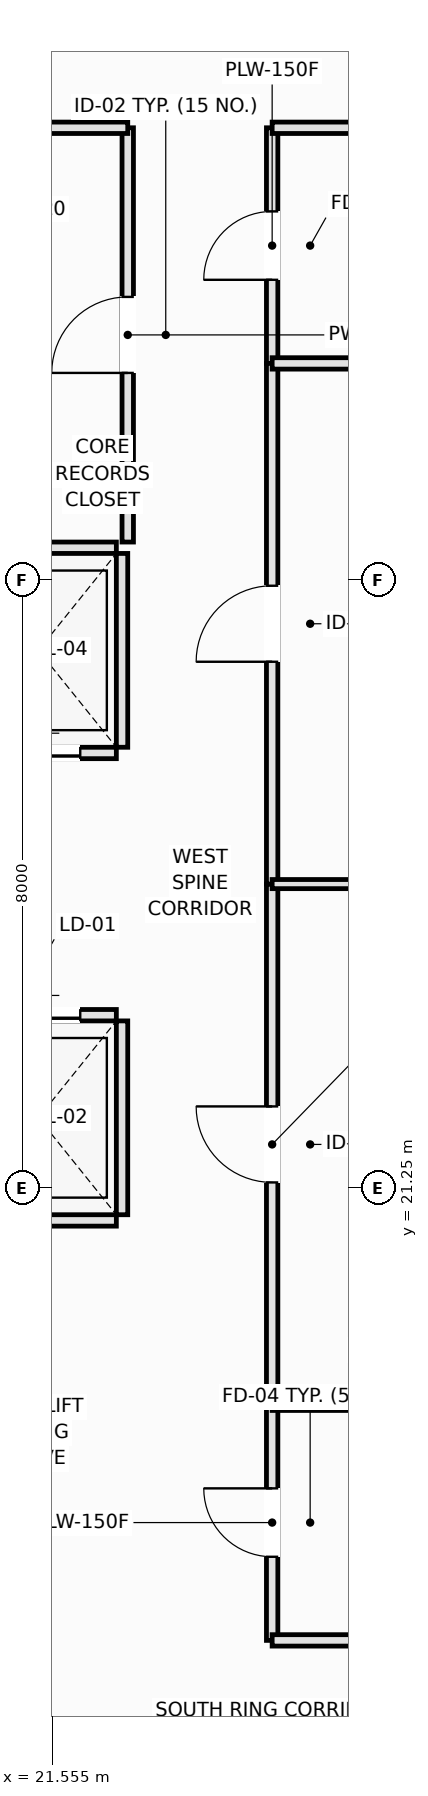
"""IFC4 building model, lengths in metres.
Left out: names, types, materials, properties, quantities, classifications, styles, units other than length and angle.
Written with IfcOpenShell. Run it as: python <this file> out.ifc"""

import sys

from ifc_helpers import new_model, si_unit, direction, frame, frame_2d, origin, place, context, subcontext, project, spatial, rectangle, extrude, element, fill, save


model = new_model("IFC4")
c1 = context("Model", 3, precision=1e-05, world=origin(), true_north=direction((0.0, 1.0)))
c2 = subcontext(c1, "Body", "Model", "MODEL_VIEW")
j1 = project(units=[si_unit("LENGTHUNIT", "METRE"), si_unit("PLANEANGLEUNIT", "RADIAN")], contexts=[c1])
p1 = place(None, origin())
s1 = spatial("IfcSite", under=j1, at=p1, CompositionType="ELEMENT")
p2 = place(p1, origin())
s2 = spatial("IfcBuilding", under=s1, at=p2, CompositionType="ELEMENT")
p3 = place(p2, frame((0.0, 0.0, 54.0)))
s3 = spatial("IfcBuildingStorey", under=s2, at=p3, CompositionType="ELEMENT", Elevation=54.0)
p4 = place(p3, frame((20.35, 20.825, 0.0), z_axis=(0.0, 0.0, 1.0), x_axis=(1.0, 0.0, 0.0)))
e1 = element("IfcWall", 1, at=p4, inside=s3, PredefinedType="PARTITIONING", context=c2, shape_type="SweptSolid", body=[
    extrude(rectangle(XDim=2.05, YDim=0.15, at=frame_2d((1.025, 0.0))), origin(), (0.0, 0.0, 1.0), 3.37),
])
p5 = place(p3, frame((20.35, 23.525, 0.0), z_axis=(0.0, 0.0, 1.0), x_axis=(1.0, 0.0, 0.0)))
e2 = element("IfcWall", 2, at=p5, inside=s3, PredefinedType="PARTITIONING", context=c2, shape_type="SweptSolid", body=[
    extrude(rectangle(XDim=2.05, YDim=0.15, at=frame_2d((1.025, 0.0))), origin(), (0.0, 0.0, 1.0), 3.37),
])
p6 = place(p5, frame((0.475, 0.0, 0.0)))
e3 = element("IfcOpeningElement", 3, at=p6, cuts=e2, PredefinedType="OPENING", context=c2, shape_type="SweptSolid", body=[
    extrude(rectangle(XDim=1.1, YDim=2.2, at=frame_2d((0.55, 1.1))), frame((0.0, 0.085, 0.0), z_axis=(0.0, -1.0, 0.0), x_axis=(1.0, 0.0, 0.0)), (0.0, 0.0, 1.0), 0.17),
])
p7 = place(p3, frame((22.475, 20.9, 0.0), z_axis=(0.0, 0.0, 1.0), x_axis=(0.0, 1.0, 0.0)))
e4 = element("IfcWall", 4, at=p7, inside=s3, PredefinedType="PARTITIONING", context=c2, shape_type="SweptSolid", body=[
    extrude(rectangle(XDim=2.55, YDim=0.15, at=frame_2d((1.275, 0.0))), origin(), (0.0, 0.0, 1.0), 3.37),
])
p8 = place(p3, frame((20.35, 26.975, 0.0), z_axis=(0.0, 0.0, 1.0), x_axis=(1.0, 0.0, 0.0)))
e5 = element("IfcWall", 5, at=p8, inside=s3, PredefinedType="PARTITIONING", context=c2, shape_type="SweptSolid", body=[
    extrude(rectangle(XDim=2.05, YDim=0.15, at=frame_2d((1.025, 0.0))), origin(), (0.0, 0.0, 1.0), 3.37),
])
p9 = place(p8, frame((0.475, 0.0, 0.0)))
e6 = element("IfcOpeningElement", 6, at=p9, cuts=e5, PredefinedType="OPENING", context=c2, shape_type="SweptSolid", body=[
    extrude(rectangle(XDim=1.1, YDim=2.2, at=frame_2d((0.55, 1.1))), frame((0.0, 0.085, 0.0), z_axis=(0.0, -1.0, 0.0), x_axis=(1.0, 0.0, 0.0)), (0.0, 0.0, 1.0), 0.17),
])
p10 = place(p3, frame((20.35, 29.675, 0.0), z_axis=(0.0, 0.0, 1.0), x_axis=(1.0, 0.0, 0.0)))
e7 = element("IfcWall", 7, at=p10, inside=s3, PredefinedType="PARTITIONING", context=c2, shape_type="SweptSolid", body=[
    extrude(rectangle(XDim=2.05, YDim=0.15, at=frame_2d((1.025, 0.0))), origin(), (0.0, 0.0, 1.0), 3.37),
])
p11 = place(p3, frame((22.475, 27.05, 0.0), z_axis=(0.0, 0.0, 1.0), x_axis=(0.0, 1.0, 0.0)))
e8 = element("IfcWall", 8, at=p11, inside=s3, PredefinedType="PARTITIONING", context=c2, shape_type="SweptSolid", body=[
    extrude(rectangle(XDim=2.55, YDim=0.15, at=frame_2d((1.275, 0.0))), origin(), (0.0, 0.0, 1.0), 3.37),
])
p12 = place(p3, frame((22.55, 29.75, 0.0), z_axis=(0.0, 0.0, 1.0), x_axis=(0.0, 1.0, 0.0)))
e9 = element("IfcWall", 9, at=p12, inside=s3, PredefinedType="PARTITIONING", context=c2, shape_type="SweptSolid", body=[
    extrude(rectangle(XDim=5.45, YDim=0.15, at=frame_2d((2.725, 0.0))), origin(), (0.0, 0.0, 1.0), 3.01),
])
p13 = place(p12, frame((2.225, 0.0, 0.0)))
e10 = element("IfcOpeningElement", 10, at=p13, cuts=e9, PredefinedType="OPENING", context=c2, shape_type="SweptSolid", body=[
    extrude(rectangle(XDim=1.0, YDim=2.15, at=frame_2d((0.5, 1.075))), frame((0.0, 0.085, 0.0), z_axis=(0.0, -1.0, 0.0), x_axis=(1.0, 0.0, 0.0)), (0.0, 0.0, 1.0), 0.17),
])
p14 = place(p3, frame((24.45, 15.3, 0.0), z_axis=(0.0, 0.0, 1.0), x_axis=(0.0, 1.0, 0.0)))
e11 = element("IfcWall", 11, at=p14, inside=s3, PredefinedType="PLUMBINGWALL", context=c2, shape_type="SweptSolid", body=[
    extrude(rectangle(XDim=3.1, YDim=0.15, at=frame_2d((1.55, 0.0))), origin(), (0.0, 0.0, 1.0), 3.37),
])
p15 = place(p14, frame((1.1, 0.0, 0.0)))
e12 = element("IfcOpeningElement", 12, at=p15, cuts=e11, PredefinedType="OPENING", context=c2, shape_type="SweptSolid", body=[
    extrude(rectangle(XDim=0.9, YDim=2.1, at=frame_2d((0.45, 1.05))), frame((0.0, 0.085, 0.0), z_axis=(0.0, -1.0, 0.0), x_axis=(1.0, 0.0, 0.0)), (0.0, 0.0, 1.0), 0.17),
])
p16 = place(p3, frame((24.45, 32.1, 0.0), z_axis=(0.0, 0.0, 1.0), x_axis=(0.0, 1.0, 0.0)))
e13 = element("IfcWall", 13, at=p16, inside=s3, PredefinedType="PLUMBINGWALL", context=c2, shape_type="SweptSolid", body=[
    extrude(rectangle(XDim=3.1, YDim=0.15, at=frame_2d((1.55, 0.0))), origin(), (0.0, 0.0, 1.0), 3.37),
])
p17 = place(p16, frame((1.1, 0.0, 0.0)))
e14 = element("IfcOpeningElement", 14, at=p17, cuts=e13, PredefinedType="OPENING", context=c2, shape_type="SweptSolid", body=[
    extrude(rectangle(XDim=0.9, YDim=2.1, at=frame_2d((0.45, 1.05))), frame((0.0, 0.085, 0.0), z_axis=(0.0, -1.0, 0.0), x_axis=(1.0, 0.0, 0.0)), (0.0, 0.0, 1.0), 0.17),
])
p18 = place(p3, frame((24.45, 18.4, 0.0), z_axis=(0.0, 0.0, 1.0), x_axis=(0.0, 1.0, 0.0)))
e15 = element("IfcWall", 15, at=p18, inside=s3, PredefinedType="PARTITIONING", context=c2, shape_type="SweptSolid", body=[
    extrude(rectangle(XDim=6.85, YDim=0.15, at=frame_2d((3.425, 0.0))), origin(), (0.0, 0.0, 1.0), 3.37),
])
p19 = place(p18, frame((2.925, 0.0, 0.0)))
e16 = element("IfcOpeningElement", 16, at=p19, cuts=e15, PredefinedType="OPENING", context=c2, shape_type="SweptSolid", body=[
    extrude(rectangle(XDim=1.0, YDim=2.15, at=frame_2d((0.5, 1.075))), frame((0.0, 0.085, 0.0), z_axis=(0.0, -1.0, 0.0), x_axis=(1.0, 0.0, 0.0)), (0.0, 0.0, 1.0), 0.17),
])
p20 = place(p3, frame((24.45, 25.25, 0.0), z_axis=(0.0, 0.0, 1.0), x_axis=(0.0, 1.0, 0.0)))
e17 = element("IfcWall", 17, at=p20, inside=s3, PredefinedType="PARTITIONING", context=c2, shape_type="SweptSolid", body=[
    extrude(rectangle(XDim=6.85, YDim=0.15, at=frame_2d((3.425, 0.0))), origin(), (0.0, 0.0, 1.0), 3.37),
])
p21 = place(p20, frame((2.925, 0.0, 0.0)))
e18 = element("IfcOpeningElement", 18, at=p21, cuts=e17, PredefinedType="OPENING", context=c2, shape_type="SweptSolid", body=[
    extrude(rectangle(XDim=1.0, YDim=2.15, at=frame_2d((0.5, 1.075))), frame((0.0, 0.085, 0.0), z_axis=(0.0, -1.0, 0.0), x_axis=(1.0, 0.0, 0.0)), (0.0, 0.0, 1.0), 0.17),
])
p22 = place(p3, frame((24.45, 15.3, 0.0), z_axis=(0.0, 0.0, 1.0), x_axis=(1.0, 0.0, 0.0)))
e19 = element("IfcWall", 19, at=p22, inside=s3, PredefinedType="PLUMBINGWALL", context=c2, shape_type="SweptSolid", body=[
    extrude(rectangle(XDim=3.15, YDim=0.15, at=frame_2d((1.575, 0.0))), origin(), (0.0, 0.0, 1.0), 3.37),
])
p23 = place(p3, frame((21.25, 35.2, 0.0), z_axis=(0.0, 0.0, 1.0), x_axis=(1.0, 0.0, 0.0)))
e20 = element("IfcWall", 20, at=p23, inside=s3, PredefinedType="PARTITIONING", context=c2, shape_type="SweptSolid", body=[
    extrude(rectangle(XDim=1.3, YDim=0.15, at=frame_2d((0.65, 0.0))), origin(), (0.0, 0.0, 1.0), 3.37),
])
p24 = place(p3, frame((24.45, 35.2, 0.0), z_axis=(0.0, 0.0, 1.0), x_axis=(1.0, 0.0, 0.0)))
e21 = element("IfcWall", 21, at=p24, inside=s3, PredefinedType="PLUMBINGWALL", context=c2, shape_type="SweptSolid", body=[
    extrude(rectangle(XDim=3.15, YDim=0.15, at=frame_2d((1.575, 0.0))), origin(), (0.0, 0.0, 1.0), 3.37),
])
for number, where, z_axis, x_axis in (
    (22, (24.45, 18.4, 0.0), (0.0, 0.0, 1.0), (1.0, 0.0, 0.0)),
    (23, (24.45, 32.1, 0.0), (0.0, 0.0, 1.0), (1.0, 0.0, 0.0)),
):
    element("IfcWall", number, at=place(p3, frame(where, z_axis=z_axis, x_axis=x_axis)), inside=s3, PredefinedType="PLUMBINGWALL", context=c2, shape_type="SweptSolid", body=[
        extrude(rectangle(XDim=3.15, YDim=0.15, at=frame_2d((1.575, 0.0))), origin(), (0.0, 0.0, 1.0), 2.72),
    ])
p25 = place(p3, frame((24.45, 25.25, 0.0), z_axis=(0.0, 0.0, 1.0), x_axis=(1.0, 0.0, 0.0)))
e24 = element("IfcWall", 24, at=p25, inside=s3, PredefinedType="PARTITIONING", context=c2, shape_type="SweptSolid", body=[
    extrude(rectangle(XDim=13.75, YDim=0.12, at=frame_2d((6.875, 0.0))), origin(), (0.0, 0.0, 1.0), 2.72),
])
p26 = place(p6, origin())
e25 = element("IfcDoor", 25, at=p26, inside=s3, OperationType="DOUBLE_DOOR_SLIDING", PredefinedType="DOOR", context=c2, shape_type="SweptSolid", body=[
    extrude(rectangle(XDim=1.1, YDim=2.2, at=frame_2d((0.55, 1.1))), frame((0.0, 0.025, 0.0), z_axis=(0.0, -1.0, 0.0), x_axis=(1.0, 0.0, 0.0)), (0.0, 0.0, 1.0), 0.05),
])
fill(e3, e25)
p27 = place(p9, origin())
e26 = element("IfcDoor", 26, at=p27, inside=s3, OperationType="DOUBLE_DOOR_SLIDING", PredefinedType="DOOR", context=c2, shape_type="SweptSolid", body=[
    extrude(rectangle(XDim=1.1, YDim=2.2, at=frame_2d((0.55, 1.1))), frame((0.0, 0.025, 0.0), z_axis=(0.0, -1.0, 0.0), x_axis=(1.0, 0.0, 0.0)), (0.0, 0.0, 1.0), 0.05),
])
fill(e6, e26)
p28 = place(p13, origin())
e27 = element("IfcDoor", 27, at=p28, inside=s3, OperationType="SINGLE_SWING_LEFT", PredefinedType="DOOR", context=c2, shape_type="SweptSolid", body=[
    extrude(rectangle(XDim=1.0, YDim=2.15, at=frame_2d((0.5, 1.075))), frame((0.0, 0.025, 0.0), z_axis=(0.0, -1.0, 0.0), x_axis=(1.0, 0.0, 0.0)), (0.0, 0.0, 1.0), 0.05),
])
fill(e10, e27)
p29 = place(p15, origin())
e28 = element("IfcDoor", 28, at=p29, inside=s3, OperationType="SINGLE_SWING_RIGHT", PredefinedType="DOOR", context=c2, shape_type="SweptSolid", body=[
    extrude(rectangle(XDim=0.9, YDim=2.1, at=frame_2d((0.45, 1.05))), frame((0.0, 0.025, 0.0), z_axis=(0.0, -1.0, 0.0), x_axis=(1.0, 0.0, 0.0)), (0.0, 0.0, 1.0), 0.05),
])
fill(e12, e28)
p30 = place(p17, origin())
e29 = element("IfcDoor", 29, at=p30, inside=s3, OperationType="SINGLE_SWING_LEFT", PredefinedType="DOOR", context=c2, shape_type="SweptSolid", body=[
    extrude(rectangle(XDim=0.9, YDim=2.1, at=frame_2d((0.45, 1.05))), frame((0.0, 0.025, 0.0), z_axis=(0.0, -1.0, 0.0), x_axis=(1.0, 0.0, 0.0)), (0.0, 0.0, 1.0), 0.05),
])
fill(e14, e29)
p31 = place(p19, origin())
e30 = element("IfcDoor", 30, at=p31, inside=s3, OperationType="SINGLE_SWING_RIGHT", PredefinedType="DOOR", context=c2, shape_type="SweptSolid", body=[
    extrude(rectangle(XDim=1.0, YDim=2.15, at=frame_2d((0.5, 1.075))), frame((0.0, 0.025, 0.0), z_axis=(0.0, -1.0, 0.0), x_axis=(1.0, 0.0, 0.0)), (0.0, 0.0, 1.0), 0.05),
])
fill(e16, e30)
p32 = place(p21, origin())
e31 = element("IfcDoor", 31, at=p32, inside=s3, OperationType="SINGLE_SWING_LEFT", PredefinedType="DOOR", context=c2, shape_type="SweptSolid", body=[
    extrude(rectangle(XDim=1.0, YDim=2.15, at=frame_2d((0.5, 1.075))), frame((0.0, 0.025, 0.0), z_axis=(0.0, -1.0, 0.0), x_axis=(1.0, 0.0, 0.0)), (0.0, 0.0, 1.0), 0.05),
])
fill(e18, e31)
save(model, sys.argv[1])
